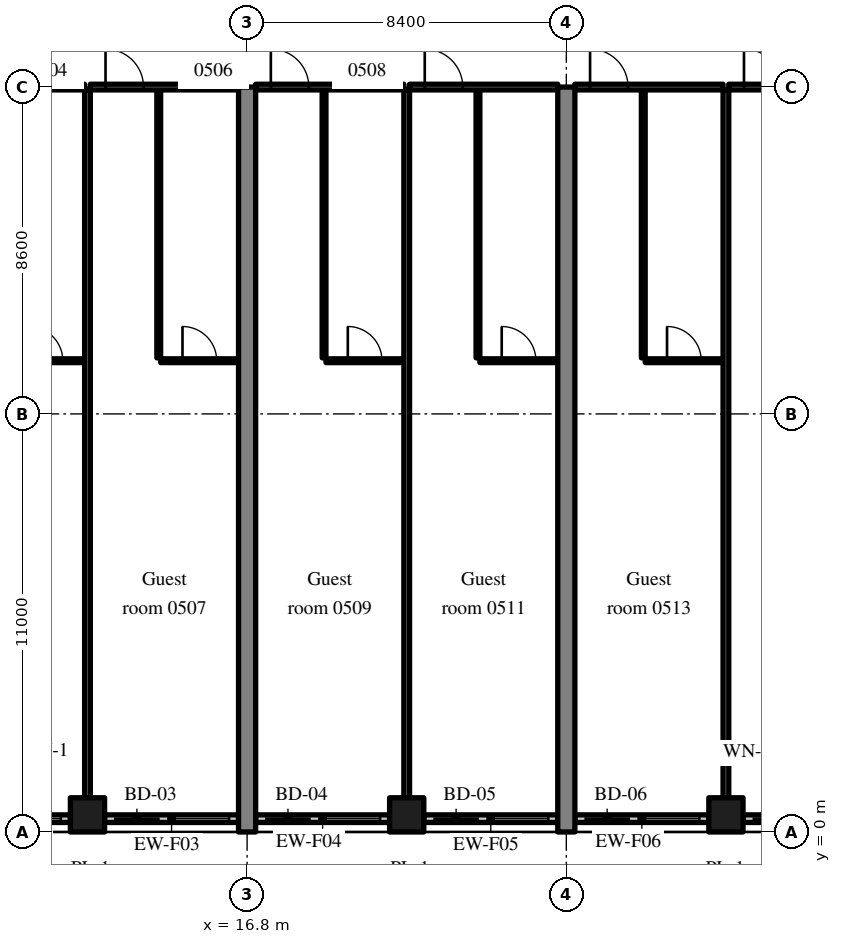
"""IFC4 building model, lengths in metres.
Left out: names, types, materials, properties, quantities, classifications, styles, units other than length and angle.
Written with IfcOpenShell. Run it as: python <this file> out.ifc"""

import sys

from ifc_helpers import new_model, si_unit, direction, frame, frame_2d, origin, origin_2d, place, context, subcontext, project, spatial, rectangle, extrude, source, transform, mapped, element, fill, save


model = new_model("IFC4")
c1 = context("Model", 3, precision=1e-05, world=origin(), true_north=direction((0.0, 1.0)))
c2 = subcontext(c1, "Body", "Model", "MODEL_VIEW")
j1 = project(units=[si_unit("LENGTHUNIT", "METRE"), si_unit("PLANEANGLEUNIT", "RADIAN")], contexts=[c1])
p1 = place(None, origin())
s1 = spatial("IfcSite", under=j1, at=p1, CompositionType="ELEMENT")
p2 = place(p1, origin())
s2 = spatial("IfcBuilding", under=s1, at=p2, CompositionType="ELEMENT")
p3 = place(p2, frame((0.0, 0.0, 27.8)))
s3 = spatial("IfcBuildingStorey", under=s2, at=p3, CompositionType="ELEMENT", Elevation=27.8)
m1 = source(origin(), c2, "Body", "SweptSolid", [
    extrude(rectangle(XDim=19.6, YDim=0.45, at=frame_2d((9.8, 0.0))), origin(), (0.0, 0.0, 1.0), 3.52),
])
for number, where, z_axis, x_axis in (
    (1, (16.8, 0.0, 0.0), (0.0, 0.0, 1.0), (0.0, 1.0, 0.0)),
    (2, (25.2, 0.0, 0.0), (0.0, 0.0, 1.0), (0.0, 1.0, 0.0)),
):
    element("IfcWall", number, at=place(p3, frame(where, z_axis=z_axis, x_axis=x_axis)), inside=s3, PredefinedType="SHEAR", context=c2, shape_type="MappedRepresentation", body=[
        mapped(m1, transform((0.0, 0.0, 0.0), scale=1.0)),
    ])
m2 = source(origin(), c2, "Body", "SweptSolid", [
    extrude(rectangle(XDim=0.9, YDim=0.9, at=origin_2d()), origin(), (0.0, 0.0, 1.0), 3.52),
])
for number, where, z_axis, x_axis in (
    (3, (12.6, 0.45, 0.0), (0.0, 0.0, 1.0), (1.0, 0.0, 0.0)),
    (4, (21.0, 0.45, 0.0), (0.0, 0.0, 1.0), (1.0, 0.0, 0.0)),
    (5, (29.4, 0.45, 0.0), (0.0, 0.0, 1.0), (1.0, 0.0, 0.0)),
):
    element("IfcColumn", number, at=place(p3, frame(where, z_axis=z_axis, x_axis=x_axis)), inside=s3, PredefinedType="COLUMN", context=c2, shape_type="MappedRepresentation", body=[
        mapped(m2, transform((0.0, 0.0, 0.0), scale=1.0)),
    ])
m3 = source(origin(), c2, "Body", "SweptSolid", [
    extrude(rectangle(XDim=3.525, YDim=0.2, at=frame_2d((1.762, 0.0))), origin(), (0.0, 0.0, 1.0), 2.77),
])
p4 = place(p3, frame((8.625, 0.35, 0.0), z_axis=(0.0, 0.0, 1.0), x_axis=(1.0, 0.0, 0.0)))
e6 = element("IfcWall", 6, at=p4, inside=s3, PredefinedType="SOLIDWALL", context=c2, shape_type="MappedRepresentation", body=[
    mapped(m3, transform((0.0, 0.0, 0.0), scale=1.0)),
])
m4 = source(origin(), c2, "Body", "SweptSolid", [
    extrude(rectangle(XDim=1.2, YDim=2.4, at=frame_2d((0.6, 1.2))), frame((0.0, 0.11, 0.0), z_axis=(0.0, -1.0, 0.0), x_axis=(1.0, 0.0, 0.0)), (0.0, 0.0, 1.0), 0.22),
])
p5 = place(p4, frame((0.25, 0.0, 0.0)))
e7 = element("IfcOpeningElement", 7, at=p5, cuts=e6, PredefinedType="OPENING", context=c2, shape_type="MappedRepresentation", body=[
    mapped(m4, transform((0.0, 0.0, 0.0), scale=1.0)),
])
m5 = source(origin(), c2, "Body", "SweptSolid", [
    extrude(rectangle(XDim=1.5, YDim=1.5, at=frame_2d((0.75, 0.75))), frame((0.0, 0.11, 0.0), z_axis=(0.0, -1.0, 0.0), x_axis=(1.0, 0.0, 0.0)), (0.0, 0.0, 1.0), 0.22),
])
p6 = place(p4, frame((1.775, 0.0, 0.9)))
e8 = element("IfcOpeningElement", 8, at=p6, cuts=e6, PredefinedType="OPENING", context=c2, shape_type="MappedRepresentation", body=[
    mapped(m5, transform((0.0, 0.0, 0.0), scale=1.0)),
])
p7 = place(p3, frame((13.05, 0.35, 0.0), z_axis=(0.0, 0.0, 1.0), x_axis=(1.0, 0.0, 0.0)))
e9 = element("IfcWall", 9, at=p7, inside=s3, PredefinedType="SOLIDWALL", context=c2, shape_type="MappedRepresentation", body=[
    mapped(m3, transform((0.0, 0.0, 0.0), scale=1.0)),
])
p8 = place(p7, frame((0.25, 0.0, 0.0)))
e10 = element("IfcOpeningElement", 10, at=p8, cuts=e9, PredefinedType="OPENING", context=c2, shape_type="MappedRepresentation", body=[
    mapped(m4, transform((0.0, 0.0, 0.0), scale=1.0)),
])
p9 = place(p7, frame((1.775, 0.0, 0.9)))
e11 = element("IfcOpeningElement", 11, at=p9, cuts=e9, PredefinedType="OPENING", context=c2, shape_type="MappedRepresentation", body=[
    mapped(m5, transform((0.0, 0.0, 0.0), scale=1.0)),
])
m6 = source(origin(), c2, "Body", "SweptSolid", [
    extrude(rectangle(XDim=3.525, YDim=0.2, at=frame_2d((1.763, 0.0))), origin(), (0.0, 0.0, 1.0), 2.77),
])
p10 = place(p3, frame((17.025, 0.35, 0.0), z_axis=(0.0, 0.0, 1.0), x_axis=(1.0, 0.0, 0.0)))
e12 = element("IfcWall", 12, at=p10, inside=s3, PredefinedType="SOLIDWALL", context=c2, shape_type="MappedRepresentation", body=[
    mapped(m6, transform((0.0, 0.0, 0.0), scale=1.0)),
])
p11 = place(p10, frame((0.25, 0.0, 0.0)))
e13 = element("IfcOpeningElement", 13, at=p11, cuts=e12, PredefinedType="OPENING", context=c2, shape_type="MappedRepresentation", body=[
    mapped(m4, transform((0.0, 0.0, 0.0), scale=1.0)),
])
p12 = place(p10, frame((1.775, 0.0, 0.9)))
e14 = element("IfcOpeningElement", 14, at=p12, cuts=e12, PredefinedType="OPENING", context=c2, shape_type="MappedRepresentation", body=[
    mapped(m5, transform((0.0, 0.0, 0.0), scale=1.0)),
])
p13 = place(p3, frame((21.45, 0.35, 0.0), z_axis=(0.0, 0.0, 1.0), x_axis=(1.0, 0.0, 0.0)))
e15 = element("IfcWall", 15, at=p13, inside=s3, PredefinedType="SOLIDWALL", context=c2, shape_type="MappedRepresentation", body=[
    mapped(m6, transform((0.0, 0.0, 0.0), scale=1.0)),
])
p14 = place(p13, frame((0.25, 0.0, 0.0)))
e16 = element("IfcOpeningElement", 16, at=p14, cuts=e15, PredefinedType="OPENING", context=c2, shape_type="MappedRepresentation", body=[
    mapped(m4, transform((0.0, 0.0, 0.0), scale=1.0)),
])
p15 = place(p13, frame((1.775, 0.0, 0.9)))
e17 = element("IfcOpeningElement", 17, at=p15, cuts=e15, PredefinedType="OPENING", context=c2, shape_type="MappedRepresentation", body=[
    mapped(m5, transform((0.0, 0.0, 0.0), scale=1.0)),
])
p16 = place(p3, frame((25.425, 0.35, 0.0), z_axis=(0.0, 0.0, 1.0), x_axis=(1.0, 0.0, 0.0)))
e18 = element("IfcWall", 18, at=p16, inside=s3, PredefinedType="SOLIDWALL", context=c2, shape_type="MappedRepresentation", body=[
    mapped(m3, transform((0.0, 0.0, 0.0), scale=1.0)),
])
p17 = place(p16, frame((0.25, 0.0, 0.0)))
e19 = element("IfcOpeningElement", 19, at=p17, cuts=e18, PredefinedType="OPENING", context=c2, shape_type="MappedRepresentation", body=[
    mapped(m4, transform((0.0, 0.0, 0.0), scale=1.0)),
])
p18 = place(p16, frame((1.775, 0.0, 0.9)))
e20 = element("IfcOpeningElement", 20, at=p18, cuts=e18, PredefinedType="OPENING", context=c2, shape_type="MappedRepresentation", body=[
    mapped(m5, transform((0.0, 0.0, 0.0), scale=1.0)),
])
p19 = place(p3, frame((29.85, 0.35, 0.0), z_axis=(0.0, 0.0, 1.0), x_axis=(1.0, 0.0, 0.0)))
e21 = element("IfcWall", 21, at=p19, inside=s3, PredefinedType="SOLIDWALL", context=c2, shape_type="MappedRepresentation", body=[
    mapped(m3, transform((0.0, 0.0, 0.0), scale=1.0)),
])
p20 = place(p19, frame((0.25, 0.0, 0.0)))
e22 = element("IfcOpeningElement", 22, at=p20, cuts=e21, PredefinedType="OPENING", context=c2, shape_type="MappedRepresentation", body=[
    mapped(m4, transform((0.0, 0.0, 0.0), scale=1.0)),
])
p21 = place(p19, frame((1.775, 0.0, 0.9)))
e23 = element("IfcOpeningElement", 23, at=p21, cuts=e21, PredefinedType="OPENING", context=c2, shape_type="MappedRepresentation", body=[
    mapped(m5, transform((0.0, 0.0, 0.0), scale=1.0)),
])
m7 = source(origin(), c2, "Body", "SweptSolid", [
    extrude(rectangle(XDim=2.05, YDim=0.1, at=frame_2d((1.025, 0.0))), origin(), (0.0, 0.0, 1.0), 3.52),
])
p22 = place(p3, frame((10.475, 12.4, 0.0), z_axis=(0.0, 0.0, 1.0), x_axis=(1.0, 0.0, 0.0)))
e24 = element("IfcWall", 24, at=p22, inside=s3, PredefinedType="PARTITIONING", context=c2, shape_type="MappedRepresentation", body=[
    mapped(m7, transform((0.0, 0.0, 0.0), scale=1.0)),
])
m8 = source(origin(), c2, "Body", "SweptSolid", [
    extrude(rectangle(XDim=0.9, YDim=2.1, at=frame_2d((0.45, 1.05))), frame((0.0, 0.06, 0.0), z_axis=(0.0, -1.0, 0.0), x_axis=(1.0, 0.0, 0.0)), (0.0, 0.0, 1.0), 0.12),
])
p23 = place(p22, frame((0.575, 0.0, 0.0)))
e25 = element("IfcOpeningElement", 25, at=p23, cuts=e24, PredefinedType="OPENING", context=c2, shape_type="MappedRepresentation", body=[
    mapped(m8, transform((0.0, 0.0, 0.0), scale=1.0)),
])
m9 = source(origin(), c2, "Body", "SweptSolid", [
    extrude(rectangle(XDim=3.9, YDim=0.15, at=frame_2d((1.95, 0.0))), origin(), (0.0, 0.0, 1.0), 2.82),
])
p24 = place(p3, frame((8.625, 19.6, 0.0), z_axis=(0.0, 0.0, 1.0), x_axis=(1.0, 0.0, 0.0)))
e26 = element("IfcWall", 26, at=p24, inside=s3, PredefinedType="PARTITIONING", context=c2, shape_type="MappedRepresentation", body=[
    mapped(m9, transform((0.0, 0.0, 0.0), scale=1.0)),
])
m10 = source(origin(), c2, "Body", "SweptSolid", [
    extrude(rectangle(XDim=1.0, YDim=2.1, at=frame_2d((0.5, 1.05))), frame((0.0, 0.085, 0.0), z_axis=(0.0, -1.0, 0.0), x_axis=(1.0, 0.0, 0.0)), (0.0, 0.0, 1.0), 0.17),
])
p25 = place(p24, frame((0.4, 0.0, 0.0)))
e27 = element("IfcOpeningElement", 27, at=p25, cuts=e26, PredefinedType="OPENING", context=c2, shape_type="MappedRepresentation", body=[
    mapped(m10, transform((0.0, 0.0, 0.0), scale=1.0)),
])
m11 = source(origin(), c2, "Body", "SweptSolid", [
    extrude(rectangle(XDim=7.05, YDim=0.1, at=frame_2d((3.525, 0.0))), origin(), (0.0, 0.0, 1.0), 3.52),
])
p26 = place(p3, frame((14.475, 12.475, 0.0), z_axis=(0.0, 0.0, 1.0), x_axis=(0.0, 1.0, 0.0)))
e28 = element("IfcWall", 28, at=p26, inside=s3, PredefinedType="PARTITIONING", context=c2, shape_type="MappedRepresentation", body=[
    mapped(m11, transform((0.0, 0.0, 0.0), scale=1.0)),
])
m12 = source(origin(), c2, "Body", "SweptSolid", [
    extrude(rectangle(XDim=2.05, YDim=0.1, at=frame_2d((1.025, 0.0))), origin(), (0.0, 0.0, 1.0), 3.52),
])
p27 = place(p3, frame((14.525, 12.4, 0.0), z_axis=(0.0, 0.0, 1.0), x_axis=(1.0, 0.0, 0.0)))
e29 = element("IfcWall", 29, at=p27, inside=s3, PredefinedType="PARTITIONING", context=c2, shape_type="MappedRepresentation", body=[
    mapped(m12, transform((0.0, 0.0, 0.0), scale=1.0)),
])
p28 = place(p27, frame((0.575, 0.0, 0.0)))
e30 = element("IfcOpeningElement", 30, at=p28, cuts=e29, PredefinedType="OPENING", context=c2, shape_type="MappedRepresentation", body=[
    mapped(m8, transform((0.0, 0.0, 0.0), scale=1.0)),
])
p29 = place(p3, frame((12.675, 19.6, 0.0), z_axis=(0.0, 0.0, 1.0), x_axis=(1.0, 0.0, 0.0)))
e31 = element("IfcWall", 31, at=p29, inside=s3, PredefinedType="PARTITIONING", context=c2, shape_type="MappedRepresentation", body=[
    mapped(m9, transform((0.0, 0.0, 0.0), scale=1.0)),
])
p30 = place(p29, frame((0.4, 0.0, 0.0)))
e32 = element("IfcOpeningElement", 32, at=p30, cuts=e31, PredefinedType="OPENING", context=c2, shape_type="MappedRepresentation", body=[
    mapped(m10, transform((0.0, 0.0, 0.0), scale=1.0)),
])
m13 = source(origin(), c2, "Body", "SweptSolid", [
    extrude(rectangle(XDim=18.625, YDim=0.15, at=frame_2d((9.312, 0.0))), origin(), (0.0, 0.0, 1.0), 3.52),
])
p31 = place(p3, frame((12.6, 0.9, 0.0), z_axis=(0.0, 0.0, 1.0), x_axis=(0.0, 1.0, 0.0)))
e33 = element("IfcWall", 33, at=p31, inside=s3, PredefinedType="PARTITIONING", context=c2, shape_type="MappedRepresentation", body=[
    mapped(m13, transform((0.0, 0.0, 0.0), scale=1.0)),
])
p32 = place(p3, frame((18.825, 12.475, 0.0), z_axis=(0.0, 0.0, 1.0), x_axis=(0.0, 1.0, 0.0)))
e34 = element("IfcWall", 34, at=p32, inside=s3, PredefinedType="PARTITIONING", context=c2, shape_type="MappedRepresentation", body=[
    mapped(m11, transform((0.0, 0.0, 0.0), scale=1.0)),
])
p33 = place(p3, frame((18.875, 12.4, 0.0), z_axis=(0.0, 0.0, 1.0), x_axis=(1.0, 0.0, 0.0)))
e35 = element("IfcWall", 35, at=p33, inside=s3, PredefinedType="PARTITIONING", context=c2, shape_type="MappedRepresentation", body=[
    mapped(m12, transform((0.0, 0.0, 0.0), scale=1.0)),
])
p34 = place(p33, frame((0.575, 0.0, 0.0)))
e36 = element("IfcOpeningElement", 36, at=p34, cuts=e35, PredefinedType="OPENING", context=c2, shape_type="MappedRepresentation", body=[
    mapped(m8, transform((0.0, 0.0, 0.0), scale=1.0)),
])
m14 = source(origin(), c2, "Body", "SweptSolid", [
    extrude(rectangle(XDim=3.9, YDim=0.15, at=frame_2d((1.95, 0.0))), origin(), (0.0, 0.0, 1.0), 2.82),
])
p35 = place(p3, frame((17.025, 19.6, 0.0), z_axis=(0.0, 0.0, 1.0), x_axis=(1.0, 0.0, 0.0)))
e37 = element("IfcWall", 37, at=p35, inside=s3, PredefinedType="PARTITIONING", context=c2, shape_type="MappedRepresentation", body=[
    mapped(m14, transform((0.0, 0.0, 0.0), scale=1.0)),
])
p36 = place(p35, frame((0.4, 0.0, 0.0)))
e38 = element("IfcOpeningElement", 38, at=p36, cuts=e37, PredefinedType="OPENING", context=c2, shape_type="MappedRepresentation", body=[
    mapped(m10, transform((0.0, 0.0, 0.0), scale=1.0)),
])
p37 = place(p3, frame((22.875, 12.475, 0.0), z_axis=(0.0, 0.0, 1.0), x_axis=(0.0, 1.0, 0.0)))
e39 = element("IfcWall", 39, at=p37, inside=s3, PredefinedType="PARTITIONING", context=c2, shape_type="MappedRepresentation", body=[
    mapped(m11, transform((0.0, 0.0, 0.0), scale=1.0)),
])
p38 = place(p3, frame((22.925, 12.4, 0.0), z_axis=(0.0, 0.0, 1.0), x_axis=(1.0, 0.0, 0.0)))
e40 = element("IfcWall", 40, at=p38, inside=s3, PredefinedType="PARTITIONING", context=c2, shape_type="MappedRepresentation", body=[
    mapped(m12, transform((0.0, 0.0, 0.0), scale=1.0)),
])
p39 = place(p38, frame((0.575, 0.0, 0.0)))
e41 = element("IfcOpeningElement", 41, at=p39, cuts=e40, PredefinedType="OPENING", context=c2, shape_type="MappedRepresentation", body=[
    mapped(m8, transform((0.0, 0.0, 0.0), scale=1.0)),
])
p40 = place(p3, frame((21.075, 19.6, 0.0), z_axis=(0.0, 0.0, 1.0), x_axis=(1.0, 0.0, 0.0)))
e42 = element("IfcWall", 42, at=p40, inside=s3, PredefinedType="PARTITIONING", context=c2, shape_type="MappedRepresentation", body=[
    mapped(m14, transform((0.0, 0.0, 0.0), scale=1.0)),
])
p41 = place(p40, frame((0.4, 0.0, 0.0)))
e43 = element("IfcOpeningElement", 43, at=p41, cuts=e42, PredefinedType="OPENING", context=c2, shape_type="MappedRepresentation", body=[
    mapped(m10, transform((0.0, 0.0, 0.0), scale=1.0)),
])
p42 = place(p3, frame((21.0, 0.9, 0.0), z_axis=(0.0, 0.0, 1.0), x_axis=(0.0, 1.0, 0.0)))
e44 = element("IfcWall", 44, at=p42, inside=s3, PredefinedType="PARTITIONING", context=c2, shape_type="MappedRepresentation", body=[
    mapped(m13, transform((0.0, 0.0, 0.0), scale=1.0)),
])
p43 = place(p3, frame((27.225, 12.475, 0.0), z_axis=(0.0, 0.0, 1.0), x_axis=(0.0, 1.0, 0.0)))
e45 = element("IfcWall", 45, at=p43, inside=s3, PredefinedType="PARTITIONING", context=c2, shape_type="MappedRepresentation", body=[
    mapped(m11, transform((0.0, 0.0, 0.0), scale=1.0)),
])
p44 = place(p3, frame((27.275, 12.4, 0.0), z_axis=(0.0, 0.0, 1.0), x_axis=(1.0, 0.0, 0.0)))
e46 = element("IfcWall", 46, at=p44, inside=s3, PredefinedType="PARTITIONING", context=c2, shape_type="MappedRepresentation", body=[
    mapped(m12, transform((0.0, 0.0, 0.0), scale=1.0)),
])
p45 = place(p44, frame((0.575, 0.0, 0.0)))
e47 = element("IfcOpeningElement", 47, at=p45, cuts=e46, PredefinedType="OPENING", context=c2, shape_type="MappedRepresentation", body=[
    mapped(m8, transform((0.0, 0.0, 0.0), scale=1.0)),
])
p46 = place(p3, frame((25.425, 19.6, 0.0), z_axis=(0.0, 0.0, 1.0), x_axis=(1.0, 0.0, 0.0)))
e48 = element("IfcWall", 48, at=p46, inside=s3, PredefinedType="PARTITIONING", context=c2, shape_type="MappedRepresentation", body=[
    mapped(m9, transform((0.0, 0.0, 0.0), scale=1.0)),
])
p47 = place(p46, frame((0.4, 0.0, 0.0)))
e49 = element("IfcOpeningElement", 49, at=p47, cuts=e48, PredefinedType="OPENING", context=c2, shape_type="MappedRepresentation", body=[
    mapped(m10, transform((0.0, 0.0, 0.0), scale=1.0)),
])
p48 = place(p3, frame((29.475, 19.6, 0.0), z_axis=(0.0, 0.0, 1.0), x_axis=(1.0, 0.0, 0.0)))
e50 = element("IfcWall", 50, at=p48, inside=s3, PredefinedType="PARTITIONING", context=c2, shape_type="MappedRepresentation", body=[
    mapped(m9, transform((0.0, 0.0, 0.0), scale=1.0)),
])
p49 = place(p48, frame((0.4, 0.0, 0.0)))
e51 = element("IfcOpeningElement", 51, at=p49, cuts=e50, PredefinedType="OPENING", context=c2, shape_type="MappedRepresentation", body=[
    mapped(m10, transform((0.0, 0.0, 0.0), scale=1.0)),
])
p50 = place(p3, frame((29.4, 0.9, 0.0), z_axis=(0.0, 0.0, 1.0), x_axis=(0.0, 1.0, 0.0)))
e52 = element("IfcWall", 52, at=p50, inside=s3, PredefinedType="PARTITIONING", context=c2, shape_type="MappedRepresentation", body=[
    mapped(m13, transform((0.0, 0.0, 0.0), scale=1.0)),
])
m15 = source(origin(), c2, "Body", "SweptSolid", [
    extrude(rectangle(XDim=1.5, YDim=1.5, at=frame_2d((0.75, 0.75))), frame((0.0, 0.03, 0.0), z_axis=(0.0, -1.0, 0.0), x_axis=(1.0, 0.0, 0.0)), (0.0, 0.0, 1.0), 0.06),
])
p51 = place(p6, origin())
e53 = element("IfcWindow", 53, at=p51, inside=s3, PartitioningType="SINGLE_PANEL", PredefinedType="WINDOW", context=c2, shape_type="MappedRepresentation", body=[
    mapped(m15, transform((0.0, 0.0, 0.0), scale=1.0)),
])
fill(e8, e53)
m16 = source(origin(), c2, "Body", "SweptSolid", [
    extrude(rectangle(XDim=1.2, YDim=2.4, at=frame_2d((0.6, 1.2))), frame((0.0, 0.025, 0.0), z_axis=(0.0, -1.0, 0.0), x_axis=(1.0, 0.0, 0.0)), (0.0, 0.0, 1.0), 0.05),
])
p52 = place(p8, origin())
e54 = element("IfcDoor", 54, at=p52, inside=s3, OperationType="SLIDING_TO_LEFT", PredefinedType="DOOR", context=c2, shape_type="MappedRepresentation", body=[
    mapped(m16, transform((0.0, 0.0, 0.0), scale=1.0)),
])
fill(e10, e54)
p53 = place(p9, origin())
e55 = element("IfcWindow", 55, at=p53, inside=s3, PartitioningType="SINGLE_PANEL", PredefinedType="WINDOW", context=c2, shape_type="MappedRepresentation", body=[
    mapped(m15, transform((0.0, 0.0, 0.0), scale=1.0)),
])
fill(e11, e55)
p54 = place(p11, origin())
e56 = element("IfcDoor", 56, at=p54, inside=s3, OperationType="SLIDING_TO_RIGHT", PredefinedType="DOOR", context=c2, shape_type="MappedRepresentation", body=[
    mapped(m16, transform((0.0, 0.0, 0.0), scale=1.0)),
])
fill(e13, e56)
p55 = place(p12, origin())
e57 = element("IfcWindow", 57, at=p55, inside=s3, PartitioningType="SINGLE_PANEL", PredefinedType="WINDOW", context=c2, shape_type="MappedRepresentation", body=[
    mapped(m15, transform((0.0, 0.0, 0.0), scale=1.0)),
])
fill(e14, e57)
p56 = place(p14, origin())
e58 = element("IfcDoor", 58, at=p56, inside=s3, OperationType="SLIDING_TO_LEFT", PredefinedType="DOOR", context=c2, shape_type="MappedRepresentation", body=[
    mapped(m16, transform((0.0, 0.0, 0.0), scale=1.0)),
])
fill(e16, e58)
p57 = place(p15, origin())
e59 = element("IfcWindow", 59, at=p57, inside=s3, PartitioningType="SINGLE_PANEL", PredefinedType="WINDOW", context=c2, shape_type="MappedRepresentation", body=[
    mapped(m15, transform((0.0, 0.0, 0.0), scale=1.0)),
])
fill(e17, e59)
p58 = place(p17, origin())
e60 = element("IfcDoor", 60, at=p58, inside=s3, OperationType="SLIDING_TO_RIGHT", PredefinedType="DOOR", context=c2, shape_type="MappedRepresentation", body=[
    mapped(m16, transform((0.0, 0.0, 0.0), scale=1.0)),
])
fill(e19, e60)
p59 = place(p18, origin())
e61 = element("IfcWindow", 61, at=p59, inside=s3, PartitioningType="SINGLE_PANEL", PredefinedType="WINDOW", context=c2, shape_type="MappedRepresentation", body=[
    mapped(m15, transform((0.0, 0.0, 0.0), scale=1.0)),
])
fill(e20, e61)
p60 = place(p20, origin())
e62 = element("IfcDoor", 62, at=p60, inside=s3, OperationType="SLIDING_TO_LEFT", PredefinedType="DOOR", context=c2, shape_type="MappedRepresentation", body=[
    mapped(m16, transform((0.0, 0.0, 0.0), scale=1.0)),
])
fill(e22, e62)
m17 = source(origin(), c2, "Body", "SweptSolid", [
    extrude(rectangle(XDim=0.9, YDim=2.1, at=frame_2d((0.45, 1.05))), frame((0.0, 0.025, 0.0), z_axis=(0.0, -1.0, 0.0), x_axis=(1.0, 0.0, 0.0)), (0.0, 0.0, 1.0), 0.05),
])
p61 = place(p23, origin())
e63 = element("IfcDoor", 63, at=p61, inside=s3, OperationType="SINGLE_SWING_LEFT", PredefinedType="DOOR", context=c2, shape_type="MappedRepresentation", body=[
    mapped(m17, transform((0.0, 0.0, 0.0), scale=1.0)),
])
fill(e25, e63)
p62 = place(p28, origin())
e64 = element("IfcDoor", 64, at=p62, inside=s3, OperationType="SINGLE_SWING_LEFT", PredefinedType="DOOR", context=c2, shape_type="MappedRepresentation", body=[
    mapped(m17, transform((0.0, 0.0, 0.0), scale=1.0)),
])
fill(e30, e64)
m18 = source(origin(), c2, "Body", "SweptSolid", [
    extrude(rectangle(XDim=1.0, YDim=2.1, at=frame_2d((0.5, 1.05))), frame((0.0, 0.025, 0.0), z_axis=(0.0, -1.0, 0.0), x_axis=(1.0, 0.0, 0.0)), (0.0, 0.0, 1.0), 0.05),
])
p63 = place(p30, origin())
e65 = element("IfcDoor", 65, at=p63, inside=s3, OperationType="SINGLE_SWING_LEFT", PredefinedType="DOOR", context=c2, shape_type="MappedRepresentation", body=[
    mapped(m18, transform((0.0, 0.0, 0.0), scale=1.0)),
])
fill(e32, e65)
p64 = place(p34, origin())
e66 = element("IfcDoor", 66, at=p64, inside=s3, OperationType="SINGLE_SWING_LEFT", PredefinedType="DOOR", context=c2, shape_type="MappedRepresentation", body=[
    mapped(m17, transform((0.0, 0.0, 0.0), scale=1.0)),
])
fill(e36, e66)
p65 = place(p36, origin())
e67 = element("IfcDoor", 67, at=p65, inside=s3, OperationType="SINGLE_SWING_LEFT", PredefinedType="DOOR", context=c2, shape_type="MappedRepresentation", body=[
    mapped(m18, transform((0.0, 0.0, 0.0), scale=1.0)),
])
fill(e38, e67)
p66 = place(p39, origin())
e68 = element("IfcDoor", 68, at=p66, inside=s3, OperationType="SINGLE_SWING_LEFT", PredefinedType="DOOR", context=c2, shape_type="MappedRepresentation", body=[
    mapped(m17, transform((0.0, 0.0, 0.0), scale=1.0)),
])
fill(e41, e68)
p67 = place(p41, origin())
e69 = element("IfcDoor", 69, at=p67, inside=s3, OperationType="SINGLE_SWING_LEFT", PredefinedType="DOOR", context=c2, shape_type="MappedRepresentation", body=[
    mapped(m18, transform((0.0, 0.0, 0.0), scale=1.0)),
])
fill(e43, e69)
p68 = place(p45, origin())
e70 = element("IfcDoor", 70, at=p68, inside=s3, OperationType="SINGLE_SWING_LEFT", PredefinedType="DOOR", context=c2, shape_type="MappedRepresentation", body=[
    mapped(m17, transform((0.0, 0.0, 0.0), scale=1.0)),
])
fill(e47, e70)
p69 = place(p47, origin())
e71 = element("IfcDoor", 71, at=p69, inside=s3, OperationType="SINGLE_SWING_LEFT", PredefinedType="DOOR", context=c2, shape_type="MappedRepresentation", body=[
    mapped(m18, transform((0.0, 0.0, 0.0), scale=1.0)),
])
fill(e49, e71)
p70 = place(p49, origin())
e72 = element("IfcDoor", 72, at=p70, inside=s3, OperationType="SINGLE_SWING_LEFT", PredefinedType="DOOR", context=c2, shape_type="MappedRepresentation", body=[
    mapped(m18, transform((0.0, 0.0, 0.0), scale=1.0)),
])
fill(e51, e72)
save(model, sys.argv[1])
